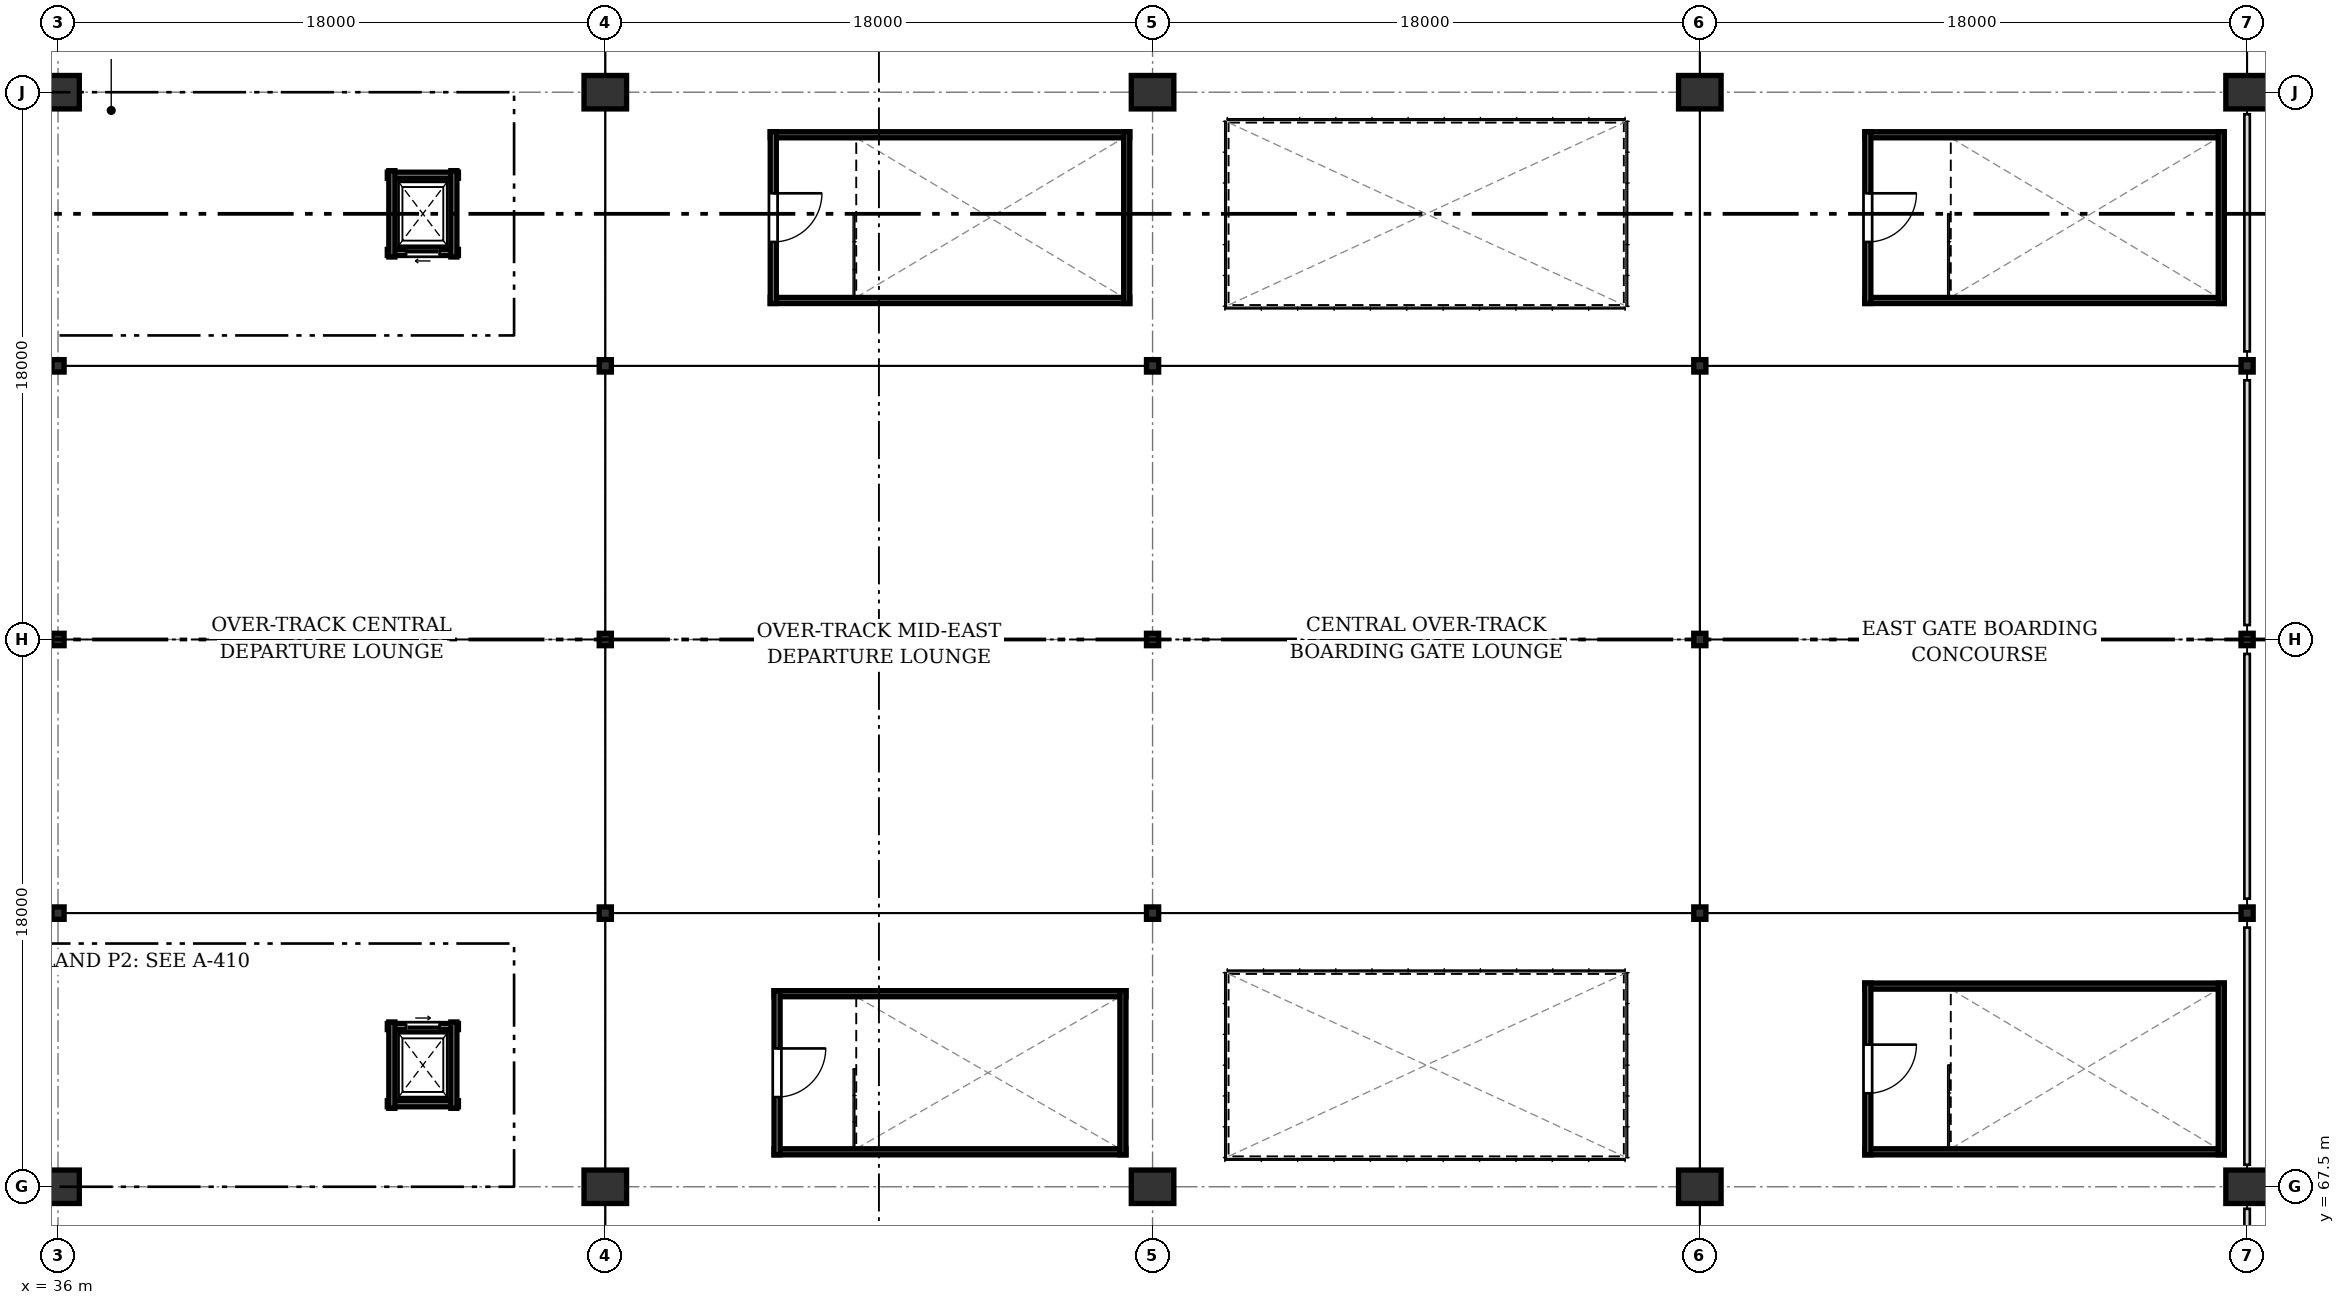
"""IFC4 building model, lengths in metres.
Left out: names, types, materials, properties, quantities, classifications, styles, units other than length and angle.
Written with IfcOpenShell. Run it as: python <this file> out.ifc"""

import sys

from ifc_helpers import new_model, si_unit, direction, frame, frame_2d, origin, origin_2d, place, context, subcontext, project, spatial, rectangle, i_section, extrude, element, fill, save


model = new_model("IFC4")
c1 = context("Model", 3, precision=1e-05, world=origin(), true_north=direction((0.0, 1.0)))
c2 = subcontext(c1, "Body", "Model", "MODEL_VIEW")
j1 = project(units=[si_unit("LENGTHUNIT", "METRE"), si_unit("PLANEANGLEUNIT", "RADIAN")], contexts=[c1])
p1 = place(None, origin())
s1 = spatial("IfcSite", under=j1, at=p1, CompositionType="ELEMENT")
p2 = place(p1, origin())
s2 = spatial("IfcBuilding", under=s1, at=p2, CompositionType="ELEMENT")
p3 = place(p2, frame((0.0, 0.0, 6.6)))
s3 = spatial("IfcBuildingStorey", under=s2, at=p3, CompositionType="ELEMENT", Elevation=6.6)
for number, where, z_axis, x_axis in (
    (1, (36.0, 67.5, 0.0), (0.0, 0.0, 1.0), (1.0, 0.0, 0.0)),
    (2, (36.0, 103.5, 0.0), (0.0, 0.0, 1.0), (1.0, 0.0, 0.0)),
    (3, (54.0, 67.5, 0.0), (0.0, 0.0, 1.0), (1.0, 0.0, 0.0)),
    (4, (54.0, 103.5, 0.0), (0.0, 0.0, 1.0), (1.0, 0.0, 0.0)),
    (5, (72.0, 67.5, 0.0), (0.0, 0.0, 1.0), (1.0, 0.0, 0.0)),
    (6, (72.0, 103.5, 0.0), (0.0, 0.0, 1.0), (1.0, 0.0, 0.0)),
    (7, (90.0, 67.5, 0.0), (0.0, 0.0, 1.0), (1.0, 0.0, 0.0)),
    (8, (90.0, 103.5, 0.0), (0.0, 0.0, 1.0), (1.0, 0.0, 0.0)),
    (9, (108.0, 67.5, 0.0), (0.0, 0.0, 1.0), (1.0, 0.0, 0.0)),
    (10, (108.0, 103.5, 0.0), (0.0, 0.0, 1.0), (1.0, 0.0, 0.0)),
):
    element("IfcColumn", number, at=place(p3, frame(where, z_axis=z_axis, x_axis=x_axis)), inside=s3, PredefinedType="COLUMN", context=c2, shape_type="SweptSolid", body=[
        extrude(rectangle(XDim=1.4, YDim=1.1, at=origin_2d()), origin(), (0.0, 0.0, 1.0), 4.2),
    ])
for number, where, z_axis, x_axis in (
    (11, (36.0, 76.5, -0.68), (0.0, 0.0, 1.0), (1.0, 0.0, 0.0)),
    (12, (36.0, 85.5, -0.68), (0.0, 0.0, 1.0), (1.0, 0.0, 0.0)),
    (13, (36.0, 94.5, -0.68), (0.0, 0.0, 1.0), (1.0, 0.0, 0.0)),
    (14, (54.0, 76.5, -0.68), (0.0, 0.0, 1.0), (1.0, 0.0, 0.0)),
    (15, (54.0, 85.5, -0.68), (0.0, 0.0, 1.0), (1.0, 0.0, 0.0)),
    (16, (54.0, 94.5, -0.68), (0.0, 0.0, 1.0), (1.0, 0.0, 0.0)),
    (17, (72.0, 76.5, -0.68), (0.0, 0.0, 1.0), (1.0, 0.0, 0.0)),
    (18, (72.0, 85.5, -0.68), (0.0, 0.0, 1.0), (1.0, 0.0, 0.0)),
    (19, (72.0, 94.5, -0.68), (0.0, 0.0, 1.0), (1.0, 0.0, 0.0)),
    (20, (90.0, 76.5, -0.68), (0.0, 0.0, 1.0), (1.0, 0.0, 0.0)),
    (21, (90.0, 85.5, -0.68), (0.0, 0.0, 1.0), (1.0, 0.0, 0.0)),
    (22, (90.0, 94.5, -0.68), (0.0, 0.0, 1.0), (1.0, 0.0, 0.0)),
    (23, (108.0, 76.5, -0.68), (0.0, 0.0, 1.0), (1.0, 0.0, 0.0)),
    (24, (108.0, 85.5, -0.68), (0.0, 0.0, 1.0), (1.0, 0.0, 0.0)),
    (25, (108.0, 94.5, -0.68), (0.0, 0.0, 1.0), (1.0, 0.0, 0.0)),
):
    element("IfcColumn", number, at=place(p3, frame(where, z_axis=z_axis, x_axis=x_axis)), inside=s3, PredefinedType="COLUMN", context=c2, shape_type="SweptSolid", body=[
        extrude(i_section(OverallWidth=0.4, OverallDepth=0.408, WebThickness=0.021, FlangeThickness=0.021, FilletRadius=0.022, at=origin_2d()), origin(), (0.0, 0.0, 1.0), 4.03),
    ])
for number, where, z_axis, x_axis in (
    (26, (59.55, 68.65, 0.0), (0.0, 0.0, 1.0), (1.0, 0.0, 0.0)),
    (27, (71.125, 73.85, 0.0), (0.0, 0.0, 1.0), (-1.0, 0.0, 0.0)),
):
    element("IfcWall", number, at=place(p3, frame(where, z_axis=z_axis, x_axis=x_axis)), inside=s3, PredefinedType="SOLIDWALL", context=c2, shape_type="SweptSolid", body=[
        extrude(rectangle(XDim=11.575, YDim=0.2, at=frame_2d((5.788, 0.0))), origin(), (0.0, 0.0, 1.0), 2.45),
    ])
p4 = place(p3, frame((71.025, 68.55, 0.0), z_axis=(0.0, 0.0, 1.0), x_axis=(0.0, 1.0, 0.0)))
e28 = element("IfcWall", 28, at=p4, inside=s3, PredefinedType="SOLIDWALL", context=c2, shape_type="SweptSolid", body=[
    extrude(rectangle(XDim=5.4, YDim=0.2, at=frame_2d((2.7, 0.0))), origin(), (0.0, 0.0, 1.0), 2.45),
])
p5 = place(p3, frame((59.65, 73.95, 0.0), z_axis=(0.0, 0.0, 1.0), x_axis=(0.0, -1.0, 0.0)))
e29 = element("IfcWall", 29, at=p5, inside=s3, PredefinedType="SOLIDWALL", context=c2, shape_type="SweptSolid", body=[
    extrude(rectangle(XDim=5.4, YDim=0.2, at=frame_2d((2.7, 0.0))), origin(), (0.0, 0.0, 1.0), 2.45),
])
p6 = place(p5, frame((1.9, 0.0, 0.0)))
e30 = element("IfcOpeningElement", 30, at=p6, cuts=e29, PredefinedType="OPENING", context=c2, shape_type="SweptSolid", body=[
    extrude(rectangle(XDim=1.6, YDim=2.15, at=frame_2d((0.8, 1.075))), frame((0.0, 0.11, 0.0), z_axis=(0.0, -1.0, 0.0), x_axis=(1.0, 0.0, 0.0)), (0.0, 0.0, 1.0), 0.22),
])
for number, where, z_axis, x_axis in (
    (31, (95.425, 68.65, 0.0), (0.0, 0.0, 1.0), (1.0, 0.0, 0.0)),
    (32, (107.25, 74.1, 0.0), (0.0, 0.0, 1.0), (-1.0, 0.0, 0.0)),
):
    element("IfcWall", number, at=place(p3, frame(where, z_axis=z_axis, x_axis=x_axis)), inside=s3, PredefinedType="SOLIDWALL", context=c2, shape_type="SweptSolid", body=[
        extrude(rectangle(XDim=11.825, YDim=0.2, at=frame_2d((5.913, 0.0))), origin(), (0.0, 0.0, 1.0), 2.45),
    ])
p7 = place(p3, frame((107.15, 68.55, 0.0), z_axis=(0.0, 0.0, 1.0), x_axis=(0.0, 1.0, 0.0)))
e33 = element("IfcWall", 33, at=p7, inside=s3, PredefinedType="SOLIDWALL", context=c2, shape_type="SweptSolid", body=[
    extrude(rectangle(XDim=5.65, YDim=0.2, at=frame_2d((2.825, 0.0))), origin(), (0.0, 0.0, 1.0), 2.45),
])
p8 = place(p3, frame((95.525, 74.2, 0.0), z_axis=(0.0, 0.0, 1.0), x_axis=(0.0, -1.0, 0.0)))
e34 = element("IfcWall", 34, at=p8, inside=s3, PredefinedType="SOLIDWALL", context=c2, shape_type="SweptSolid", body=[
    extrude(rectangle(XDim=5.65, YDim=0.2, at=frame_2d((2.825, 0.0))), origin(), (0.0, 0.0, 1.0), 2.45),
])
p9 = place(p8, frame((2.025, 0.0, 0.0)))
e35 = element("IfcOpeningElement", 35, at=p9, cuts=e34, PredefinedType="OPENING", context=c2, shape_type="SweptSolid", body=[
    extrude(rectangle(XDim=1.6, YDim=2.15, at=frame_2d((0.8, 1.075))), frame((0.0, 0.11, 0.0), z_axis=(0.0, -1.0, 0.0), x_axis=(1.0, 0.0, 0.0)), (0.0, 0.0, 1.0), 0.22),
])
for number, where, z_axis, x_axis in (
    (36, (59.425, 96.65, 0.0), (0.0, 0.0, 1.0), (1.0, 0.0, 0.0)),
    (37, (71.25, 102.1, 0.0), (0.0, 0.0, 1.0), (-1.0, 0.0, 0.0)),
):
    element("IfcWall", number, at=place(p3, frame(where, z_axis=z_axis, x_axis=x_axis)), inside=s3, PredefinedType="SOLIDWALL", context=c2, shape_type="SweptSolid", body=[
        extrude(rectangle(XDim=11.825, YDim=0.2, at=frame_2d((5.913, 0.0))), origin(), (0.0, 0.0, 1.0), 2.45),
    ])
p10 = place(p3, frame((71.15, 96.55, 0.0), z_axis=(0.0, 0.0, 1.0), x_axis=(0.0, 1.0, 0.0)))
e38 = element("IfcWall", 38, at=p10, inside=s3, PredefinedType="SOLIDWALL", context=c2, shape_type="SweptSolid", body=[
    extrude(rectangle(XDim=5.65, YDim=0.2, at=frame_2d((2.825, 0.0))), origin(), (0.0, 0.0, 1.0), 2.45),
])
p11 = place(p3, frame((59.525, 102.2, 0.0), z_axis=(0.0, 0.0, 1.0), x_axis=(0.0, -1.0, 0.0)))
e39 = element("IfcWall", 39, at=p11, inside=s3, PredefinedType="SOLIDWALL", context=c2, shape_type="SweptSolid", body=[
    extrude(rectangle(XDim=5.65, YDim=0.2, at=frame_2d((2.825, 0.0))), origin(), (0.0, 0.0, 1.0), 2.45),
])
p12 = place(p11, frame((2.025, 0.0, 0.0)))
e40 = element("IfcOpeningElement", 40, at=p12, cuts=e39, PredefinedType="OPENING", context=c2, shape_type="SweptSolid", body=[
    extrude(rectangle(XDim=1.6, YDim=2.15, at=frame_2d((0.8, 1.075))), frame((0.0, 0.11, 0.0), z_axis=(0.0, -1.0, 0.0), x_axis=(1.0, 0.0, 0.0)), (0.0, 0.0, 1.0), 0.22),
])
for number, where, z_axis, x_axis in (
    (41, (95.425, 96.65, 0.0), (0.0, 0.0, 1.0), (1.0, 0.0, 0.0)),
    (42, (107.25, 102.1, 0.0), (0.0, 0.0, 1.0), (-1.0, 0.0, 0.0)),
):
    element("IfcWall", number, at=place(p3, frame(where, z_axis=z_axis, x_axis=x_axis)), inside=s3, PredefinedType="SOLIDWALL", context=c2, shape_type="SweptSolid", body=[
        extrude(rectangle(XDim=11.825, YDim=0.2, at=frame_2d((5.913, 0.0))), origin(), (0.0, 0.0, 1.0), 2.45),
    ])
p13 = place(p3, frame((107.15, 96.55, 0.0), z_axis=(0.0, 0.0, 1.0), x_axis=(0.0, 1.0, 0.0)))
e43 = element("IfcWall", 43, at=p13, inside=s3, PredefinedType="SOLIDWALL", context=c2, shape_type="SweptSolid", body=[
    extrude(rectangle(XDim=5.65, YDim=0.2, at=frame_2d((2.825, 0.0))), origin(), (0.0, 0.0, 1.0), 2.45),
])
p14 = place(p3, frame((95.525, 102.2, 0.0), z_axis=(0.0, 0.0, 1.0), x_axis=(0.0, -1.0, 0.0)))
e44 = element("IfcWall", 44, at=p14, inside=s3, PredefinedType="SOLIDWALL", context=c2, shape_type="SweptSolid", body=[
    extrude(rectangle(XDim=5.65, YDim=0.2, at=frame_2d((2.825, 0.0))), origin(), (0.0, 0.0, 1.0), 2.45),
])
p15 = place(p14, frame((2.025, 0.0, 0.0)))
e45 = element("IfcOpeningElement", 45, at=p15, cuts=e44, PredefinedType="OPENING", context=c2, shape_type="SweptSolid", body=[
    extrude(rectangle(XDim=1.6, YDim=2.15, at=frame_2d((0.8, 1.075))), frame((0.0, 0.11, 0.0), z_axis=(0.0, -1.0, 0.0), x_axis=(1.0, 0.0, 0.0)), (0.0, 0.0, 1.0), 0.22),
])
p16 = place(p3, frame((46.83, 70.23, 0.0), z_axis=(0.0, 0.0, 1.0), x_axis=(1.0, 0.0, 0.0)))
e46 = element("IfcWall", 46, at=p16, inside=s3, PredefinedType="SOLIDWALL", context=c2, shape_type="SweptSolid", body=[
    extrude(rectangle(XDim=2.34, YDim=0.2, at=frame_2d((1.17, 0.0))), origin(), (0.0, 0.0, 1.0), 3.875),
])
p17 = place(p3, frame((49.17, 72.77, 0.0), z_axis=(0.0, 0.0, 1.0), x_axis=(-1.0, 0.0, 0.0)))
e47 = element("IfcWall", 47, at=p17, inside=s3, PredefinedType="SOLIDWALL", context=c2, shape_type="SweptSolid", body=[
    extrude(rectangle(XDim=2.34, YDim=0.2, at=frame_2d((1.17, 0.0))), origin(), (0.0, 0.0, 1.0), 3.875),
])
p18 = place(p17, frame((0.62, 0.0, 0.0)))
e48 = element("IfcOpeningElement", 48, at=p18, cuts=e47, PredefinedType="OPENING", context=c2, shape_type="SweptSolid", body=[
    extrude(rectangle(XDim=1.1, YDim=2.15, at=frame_2d((0.55, 1.075))), frame((0.0, 0.11, 0.0), z_axis=(0.0, -1.0, 0.0), x_axis=(1.0, 0.0, 0.0)), (0.0, 0.0, 1.0), 0.22),
])
for number, where, z_axis, x_axis in (
    (49, (46.98, 72.92, 0.0), (0.0, 0.0, 1.0), (0.0, -1.0, 0.0)),
    (50, (49.02, 70.08, 0.0), (0.0, 0.0, 1.0), (0.0, 1.0, 0.0)),
):
    element("IfcWall", number, at=place(p3, frame(where, z_axis=z_axis, x_axis=x_axis)), inside=s3, PredefinedType="SOLIDWALL", context=c2, shape_type="SweptSolid", body=[
        extrude(rectangle(XDim=2.84, YDim=0.2, at=frame_2d((1.42, 0.0))), origin(), (0.0, 0.0, 1.0), 3.875),
    ])
p19 = place(p3, frame((46.83, 98.23, 0.0), z_axis=(0.0, 0.0, 1.0), x_axis=(1.0, 0.0, 0.0)))
e51 = element("IfcWall", 51, at=p19, inside=s3, PredefinedType="SOLIDWALL", context=c2, shape_type="SweptSolid", body=[
    extrude(rectangle(XDim=2.34, YDim=0.2, at=frame_2d((1.17, 0.0))), origin(), (0.0, 0.0, 1.0), 3.875),
])
p20 = place(p19, frame((0.62, 0.0, 0.0)))
e52 = element("IfcOpeningElement", 52, at=p20, cuts=e51, PredefinedType="OPENING", context=c2, shape_type="SweptSolid", body=[
    extrude(rectangle(XDim=1.1, YDim=2.15, at=frame_2d((0.55, 1.075))), frame((0.0, 0.11, 0.0), z_axis=(0.0, -1.0, 0.0), x_axis=(1.0, 0.0, 0.0)), (0.0, 0.0, 1.0), 0.22),
])
p21 = place(p3, frame((49.17, 100.77, 0.0), z_axis=(0.0, 0.0, 1.0), x_axis=(-1.0, 0.0, 0.0)))
e53 = element("IfcWall", 53, at=p21, inside=s3, PredefinedType="SOLIDWALL", context=c2, shape_type="SweptSolid", body=[
    extrude(rectangle(XDim=2.34, YDim=0.2, at=frame_2d((1.17, 0.0))), origin(), (0.0, 0.0, 1.0), 3.875),
])
for number, where, z_axis, x_axis in (
    (54, (46.98, 100.92, 0.0), (0.0, 0.0, 1.0), (0.0, -1.0, 0.0)),
    (55, (49.02, 98.08, 0.0), (0.0, 0.0, 1.0), (0.0, 1.0, 0.0)),
):
    element("IfcWall", number, at=place(p3, frame(where, z_axis=z_axis, x_axis=x_axis)), inside=s3, PredefinedType="SOLIDWALL", context=c2, shape_type="SweptSolid", body=[
        extrude(rectangle(XDim=2.84, YDim=0.2, at=frame_2d((1.42, 0.0))), origin(), (0.0, 0.0, 1.0), 3.875),
    ])
p22 = place(p6, origin())
e56 = element("IfcDoor", 56, at=p22, inside=s3, OperationType="SINGLE_SWING_LEFT", PredefinedType="DOOR", context=c2, shape_type="SweptSolid", body=[
    extrude(rectangle(XDim=1.6, YDim=2.15, at=frame_2d((0.8, 1.075))), frame((0.0, 0.025, 0.0), z_axis=(0.0, -1.0, 0.0), x_axis=(1.0, 0.0, 0.0)), (0.0, 0.0, 1.0), 0.05),
])
fill(e30, e56)
p23 = place(p9, origin())
e57 = element("IfcDoor", 57, at=p23, inside=s3, OperationType="SINGLE_SWING_LEFT", PredefinedType="DOOR", context=c2, shape_type="SweptSolid", body=[
    extrude(rectangle(XDim=1.6, YDim=2.15, at=frame_2d((0.8, 1.075))), frame((0.0, 0.025, 0.0), z_axis=(0.0, -1.0, 0.0), x_axis=(1.0, 0.0, 0.0)), (0.0, 0.0, 1.0), 0.05),
])
fill(e35, e57)
p24 = place(p12, origin())
e58 = element("IfcDoor", 58, at=p24, inside=s3, OperationType="SINGLE_SWING_LEFT", PredefinedType="DOOR", context=c2, shape_type="SweptSolid", body=[
    extrude(rectangle(XDim=1.6, YDim=2.15, at=frame_2d((0.8, 1.075))), frame((0.0, 0.025, 0.0), z_axis=(0.0, -1.0, 0.0), x_axis=(1.0, 0.0, 0.0)), (0.0, 0.0, 1.0), 0.05),
])
fill(e40, e58)
p25 = place(p15, origin())
e59 = element("IfcDoor", 59, at=p25, inside=s3, OperationType="SINGLE_SWING_LEFT", PredefinedType="DOOR", context=c2, shape_type="SweptSolid", body=[
    extrude(rectangle(XDim=1.6, YDim=2.15, at=frame_2d((0.8, 1.075))), frame((0.0, 0.025, 0.0), z_axis=(0.0, -1.0, 0.0), x_axis=(1.0, 0.0, 0.0)), (0.0, 0.0, 1.0), 0.05),
])
fill(e45, e59)
p26 = place(p18, origin())
e60 = element("IfcDoor", 60, at=p26, inside=s3, OperationType="SLIDING_TO_LEFT", PredefinedType="DOOR", context=c2, shape_type="SweptSolid", body=[
    extrude(rectangle(XDim=1.1, YDim=2.15, at=frame_2d((0.55, 1.075))), frame((0.0, 0.025, 0.0), z_axis=(0.0, -1.0, 0.0), x_axis=(1.0, 0.0, 0.0)), (0.0, 0.0, 1.0), 0.05),
])
fill(e48, e60)
p27 = place(p20, origin())
e61 = element("IfcDoor", 61, at=p27, inside=s3, OperationType="SLIDING_TO_LEFT", PredefinedType="DOOR", context=c2, shape_type="SweptSolid", body=[
    extrude(rectangle(XDim=1.1, YDim=2.15, at=frame_2d((0.55, 1.075))), frame((0.0, 0.025, 0.0), z_axis=(0.0, -1.0, 0.0), x_axis=(1.0, 0.0, 0.0)), (0.0, 0.0, 1.0), 0.05),
])
fill(e52, e61)
save(model, sys.argv[1])
